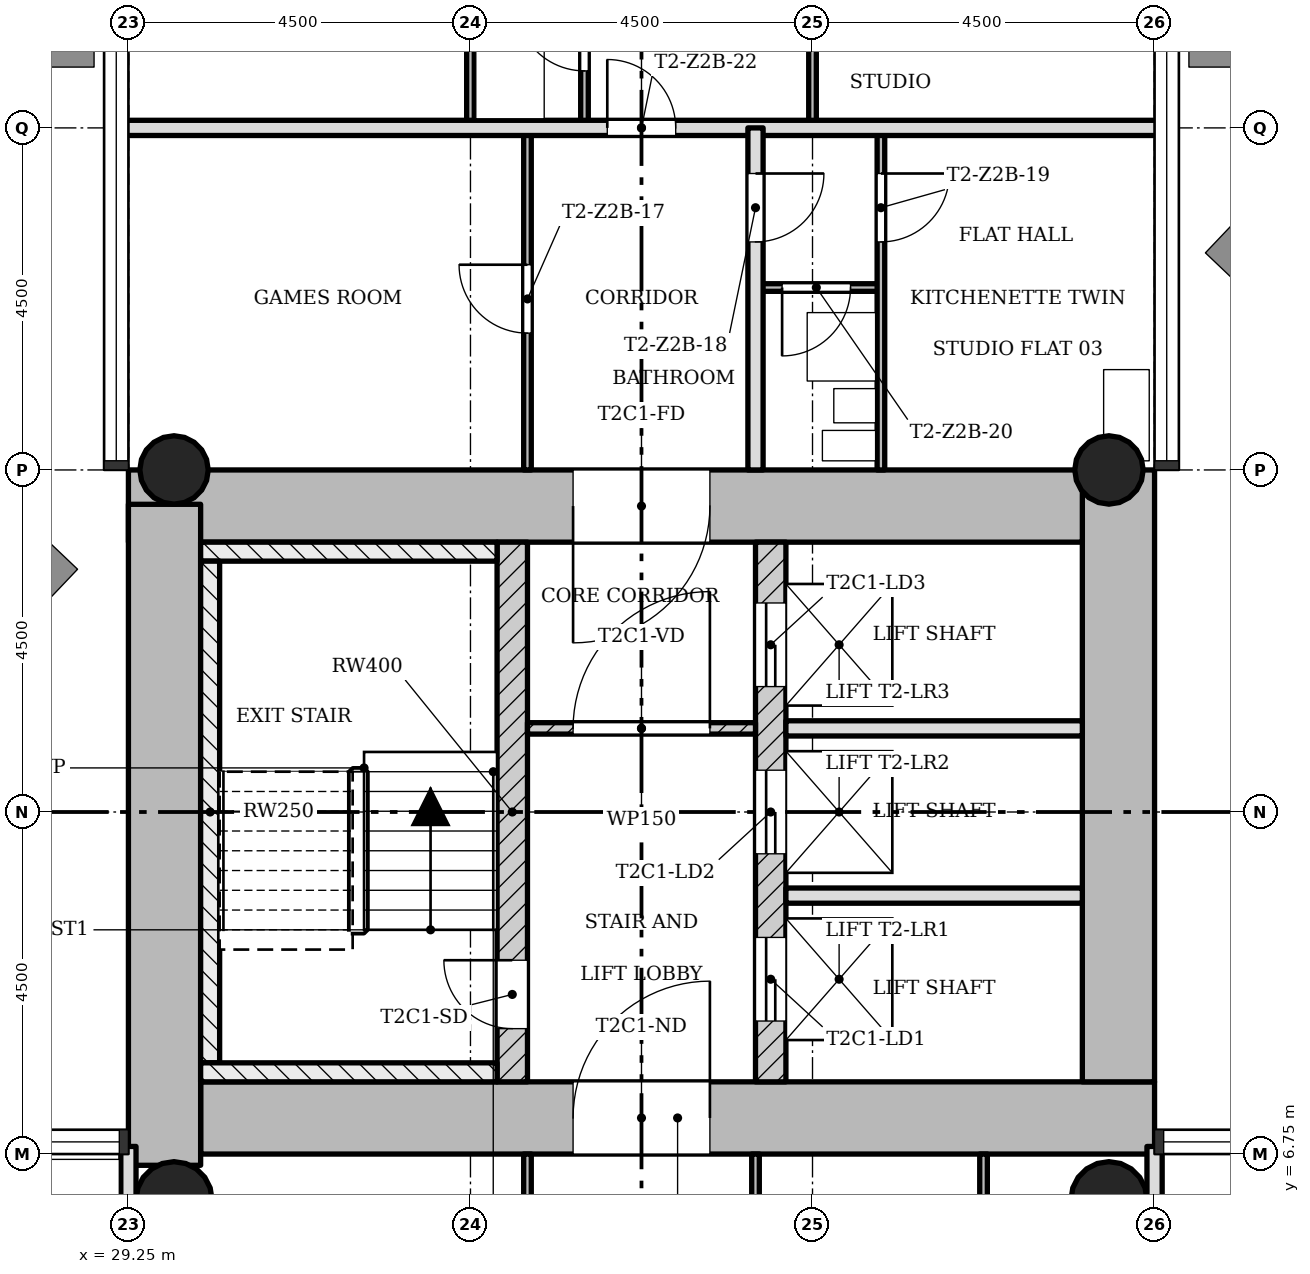
"""IFC4 building model, lengths in metres.
Left out: names, types, materials, properties, quantities, classifications, styles, units other than length and angle.
Written with IfcOpenShell. Run it as: python <this file> out.ifc"""

import sys

from ifc_helpers import new_model, si_unit, direction, frame, frame_2d, origin, origin_2d, place, context, subcontext, project, spatial, rectangle, hollow_circle, extrude, element, fill, save


model = new_model("IFC4")
c1 = context("Model", 3, precision=1e-05, world=origin(), true_north=direction((0.0, 1.0)))
c2 = subcontext(c1, "Body", "Model", "MODEL_VIEW")
j1 = project(units=[si_unit("LENGTHUNIT", "METRE"), si_unit("PLANEANGLEUNIT", "RADIAN")], contexts=[c1])
p1 = place(None, origin())
s1 = spatial("IfcSite", under=j1, at=p1, CompositionType="ELEMENT")
p2 = place(p1, origin())
s2 = spatial("IfcBuilding", under=s1, at=p2, CompositionType="ELEMENT")
p3 = place(p2, frame((0.0, 0.0, 80.0)))
s3 = spatial("IfcBuildingStorey", under=s2, at=p3, CompositionType="ELEMENT", Elevation=80.0)
p4 = place(p3, frame((30.2, 7.225, 0.0), z_axis=(0.0, 0.0, 1.0), x_axis=(1.0, 0.0, 0.0)))
e1 = element("IfcWall", 1, at=p4, inside=s3, PredefinedType="SHEAR", context=c2, shape_type="SweptSolid", body=[
    extrude(rectangle(XDim=12.55, YDim=0.95, at=frame_2d((6.275, 0.0))), origin(), (0.0, 0.0, 1.0), 3.4),
])
p5 = place(p4, frame((4.9, 0.0, 0.0)))
e2 = element("IfcOpeningElement", 2, at=p5, cuts=e1, PredefinedType="OPENING", context=c2, shape_type="SweptSolid", body=[
    extrude(rectangle(XDim=1.8, YDim=2.1, at=frame_2d((0.9, 1.05))), frame((0.0, 0.485, 0.0), z_axis=(0.0, -1.0, 0.0), x_axis=(1.0, 0.0, 0.0)), (0.0, 0.0, 1.0), 0.97),
])
p6 = place(p3, frame((42.275, 7.7, 0.0), z_axis=(0.0, 0.0, 1.0), x_axis=(0.0, 1.0, 0.0)))
e3 = element("IfcWall", 3, at=p6, inside=s3, PredefinedType="SHEAR", context=c2, shape_type="SweptSolid", body=[
    extrude(rectangle(XDim=8.05, YDim=0.95, at=frame_2d((4.025, 0.0))), origin(), (0.0, 0.0, 1.0), 3.4),
])
p7 = place(p3, frame((41.8, 15.275, 0.0), z_axis=(0.0, 0.0, 1.0), x_axis=(-1.0, 0.0, 0.0)))
e4 = element("IfcWall", 4, at=p7, inside=s3, PredefinedType="SHEAR", context=c2, shape_type="SweptSolid", body=[
    extrude(rectangle(XDim=12.55, YDim=0.95, at=frame_2d((6.275, 0.0))), origin(), (0.0, 0.0, 1.0), 3.4),
])
p8 = place(p7, frame((4.9, 0.0, 0.0)))
e5 = element("IfcOpeningElement", 5, at=p8, cuts=e4, PredefinedType="OPENING", context=c2, shape_type="SweptSolid", body=[
    extrude(rectangle(XDim=1.8, YDim=2.1, at=frame_2d((0.9, 1.05))), frame((0.0, 0.485, 0.0), z_axis=(0.0, -1.0, 0.0), x_axis=(1.0, 0.0, 0.0)), (0.0, 0.0, 1.0), 0.97),
])
p9 = place(p3, frame((29.725, 15.298, 0.0), z_axis=(0.0, 0.0, 1.0), x_axis=(0.0, -1.0, 0.0)))
e6 = element("IfcWall", 6, at=p9, inside=s3, PredefinedType="SHEAR", context=c2, shape_type="SweptSolid", body=[
    extrude(rectangle(XDim=8.696, YDim=0.95, at=frame_2d((4.348, 0.0))), origin(), (0.0, 0.0, 1.0), 3.4),
])
p10 = place(p3, frame((34.3, 7.7, 0.0), z_axis=(0.0, 0.0, 1.0), x_axis=(0.0, 1.0, 0.0)))
e7 = element("IfcWall", 7, at=p10, inside=s3, PredefinedType="SHEAR", context=c2, shape_type="SweptSolid", body=[
    extrude(rectangle(XDim=7.1, YDim=0.4, at=frame_2d((3.55, 0.0))), origin(), (0.0, 0.0, 1.0), 3.4),
])
p11 = place(p10, frame((0.7, 0.0, 0.0)))
e8 = element("IfcOpeningElement", 8, at=p11, cuts=e7, PredefinedType="OPENING", context=c2, shape_type="SweptSolid", body=[
    extrude(rectangle(XDim=0.9, YDim=2.1, at=frame_2d((0.45, 1.05))), frame((0.0, 0.21, 0.0), z_axis=(0.0, -1.0, 0.0), x_axis=(1.0, 0.0, 0.0)), (0.0, 0.0, 1.0), 0.42),
])
p12 = place(p3, frame((37.7, 7.7, 0.0), z_axis=(0.0, 0.0, 1.0), x_axis=(0.0, 1.0, 0.0)))
e9 = element("IfcWall", 9, at=p12, inside=s3, PredefinedType="SHEAR", context=c2, shape_type="SweptSolid", body=[
    extrude(rectangle(XDim=7.1, YDim=0.4, at=frame_2d((3.55, 0.0))), origin(), (0.0, 0.0, 1.0), 3.4),
])
p13 = place(p12, frame((0.8, 0.0, 0.0)))
e10 = element("IfcOpeningElement", 10, at=p13, cuts=e9, PredefinedType="OPENING", context=c2, shape_type="SweptSolid", body=[
    extrude(rectangle(XDim=1.1, YDim=2.1, at=frame_2d((0.55, 1.05))), frame((0.0, 0.21, 0.0), z_axis=(0.0, -1.0, 0.0), x_axis=(1.0, 0.0, 0.0)), (0.0, 0.0, 1.0), 0.42),
])
p14 = place(p12, frame((3.0, 0.0, 0.0)))
e11 = element("IfcOpeningElement", 11, at=p14, cuts=e9, PredefinedType="OPENING", context=c2, shape_type="SweptSolid", body=[
    extrude(rectangle(XDim=1.1, YDim=2.1, at=frame_2d((0.55, 1.05))), frame((0.0, 0.21, 0.0), z_axis=(0.0, -1.0, 0.0), x_axis=(1.0, 0.0, 0.0)), (0.0, 0.0, 1.0), 0.42),
])
p15 = place(p12, frame((5.2, 0.0, 0.0)))
e12 = element("IfcOpeningElement", 12, at=p15, cuts=e9, PredefinedType="OPENING", context=c2, shape_type="SweptSolid", body=[
    extrude(rectangle(XDim=1.1, YDim=2.1, at=frame_2d((0.55, 1.05))), frame((0.0, 0.21, 0.0), z_axis=(0.0, -1.0, 0.0), x_axis=(1.0, 0.0, 0.0)), (0.0, 0.0, 1.0), 0.42),
])
for number, where, z_axis, x_axis in (
    (13, (42.15, 15.75, 0.0), (0.0, 0.0, 1.0), (1.0, 0.0, 0.0)),
    (14, (29.85, 15.75, 0.0), (0.0, 0.0, 1.0), (1.0, 0.0, 0.0)),
):
    element("IfcColumn", number, at=place(p3, frame(where, z_axis=z_axis, x_axis=x_axis)), inside=s3, PredefinedType="COLUMN", context=c2, shape_type="SweptSolid", body=[
        extrude(hollow_circle(Radius=0.45, WallThickness=0.032, at=origin_2d()), origin(), (0.0, 0.0, 1.0), 3.4),
    ])
for number, where, z_axis, x_axis in (
    (15, (42.15, 6.15, 0.0), (0.0, 0.0, 1.0), (1.0, 0.0, 0.0)),
    (16, (29.85, 6.15, 0.0), (0.0, 0.0, 1.0), (1.0, 0.0, 0.0)),
):
    element("IfcColumn", number, at=place(p3, frame(where, z_axis=z_axis, x_axis=x_axis)), inside=s3, PredefinedType="COLUMN", context=c2, shape_type="SweptSolid", body=[
        extrude(hollow_circle(Radius=0.5, WallThickness=0.036, at=origin_2d()), origin(), (0.0, 0.0, 1.0), 3.4),
    ])
p16 = place(p3, frame((37.5, 12.35, 0.0), z_axis=(0.0, 0.0, 1.0), x_axis=(-1.0, 0.0, 0.0)))
e17 = element("IfcWall", 17, at=p16, inside=s3, PredefinedType="PARTITIONING", context=c2, shape_type="SweptSolid", body=[
    extrude(rectangle(XDim=3.0, YDim=0.15, at=frame_2d((1.5, 0.0))), origin(), (0.0, 0.0, 1.0), 3.0),
])
p17 = place(p16, frame((0.6, 0.0, 0.0)))
e18 = element("IfcOpeningElement", 18, at=p17, cuts=e17, PredefinedType="OPENING", context=c2, shape_type="SweptSolid", body=[
    extrude(rectangle(XDim=1.8, YDim=2.1, at=frame_2d((0.9, 1.05))), frame((0.0, 0.085, 0.0), z_axis=(0.0, -1.0, 0.0), x_axis=(1.0, 0.0, 0.0)), (0.0, 0.0, 1.0), 0.17),
])
for number, where, z_axis, x_axis in (
    (19, (41.8, 10.15, 0.0), (0.0, 0.0, 1.0), (-1.0, 0.0, 0.0)),
    (20, (41.8, 12.35, 0.0), (0.0, 0.0, 1.0), (-1.0, 0.0, 0.0)),
):
    element("IfcWall", number, at=place(p3, frame(where, z_axis=z_axis, x_axis=x_axis)), inside=s3, PredefinedType="SOLIDWALL", context=c2, shape_type="SweptSolid", body=[
        extrude(rectangle(XDim=3.9, YDim=0.2, at=frame_2d((1.95, 0.0))), origin(), (0.0, 0.0, 1.0), 3.0),
    ])
p18 = place(p3, frame((39.15, 18.15, 0.0), z_axis=(0.0, 0.0, 1.0), x_axis=(-1.0, 0.0, 0.0)))
e21 = element("IfcWall", 21, at=p18, inside=s3, PredefinedType="PARTITIONING", context=c2, shape_type="SweptSolid", body=[
    extrude(rectangle(XDim=1.65, YDim=0.1, at=frame_2d((0.825, 0.0))), origin(), (0.0, 0.0, 1.0), 3.0),
])
p19 = place(p18, frame((0.4, 0.0, 0.0)))
e22 = element("IfcOpeningElement", 22, at=p19, cuts=e21, PredefinedType="OPENING", context=c2, shape_type="SweptSolid", body=[
    extrude(rectangle(XDim=0.9, YDim=2.1, at=frame_2d((0.45, 1.05))), frame((0.0, 0.06, 0.0), z_axis=(0.0, -1.0, 0.0), x_axis=(1.0, 0.0, 0.0)), (0.0, 0.0, 1.0), 0.12),
])
p20 = place(p3, frame((42.85, 20.25, 0.0), z_axis=(0.0, 0.0, 1.0), x_axis=(-1.0, 0.0, 0.0)))
e23 = element("IfcWall", 23, at=p20, inside=s3, PredefinedType="SOLIDWALL", context=c2, shape_type="SweptSolid", body=[
    extrude(rectangle(XDim=13.7, YDim=0.2, at=frame_2d((6.85, 0.0))), origin(), (0.0, 0.0, 1.0), 3.0),
])
p21 = place(p20, frame((6.4, 0.0, 0.0)))
e24 = element("IfcOpeningElement", 24, at=p21, cuts=e23, PredefinedType="OPENING", context=c2, shape_type="SweptSolid", body=[
    extrude(rectangle(XDim=0.9, YDim=2.1, at=frame_2d((0.45, 1.05))), frame((0.0, 0.11, 0.0), z_axis=(0.0, -1.0, 0.0), x_axis=(1.0, 0.0, 0.0)), (0.0, 0.0, 1.0), 0.22),
])
p22 = place(p3, frame((42.75, 0.9, 0.0), z_axis=(0.0, 0.0, 1.0), x_axis=(0.0, 1.0, 0.0)))
e25 = element("IfcWall", 25, at=p22, inside=s3, PredefinedType="SOLIDWALL", context=c2, shape_type="SweptSolid", body=[
    extrude(rectangle(XDim=5.95, YDim=0.2, at=frame_2d((2.975, 0.0))), origin(), (0.0, 0.0, 1.0), 3.0),
])
p23 = place(p3, frame((40.5, 0.9, 0.0), z_axis=(0.0, 0.0, 1.0), x_axis=(0.0, 1.0, 0.0)))
e26 = element("IfcWall", 26, at=p23, inside=s3, PredefinedType="PARTITIONING", context=c2, shape_type="SweptSolid", body=[
    extrude(rectangle(XDim=5.85, YDim=0.1, at=frame_2d((2.925, 0.0))), origin(), (0.0, 0.0, 1.0), 3.0),
])
p24 = place(p3, frame((39.15, 15.75, 0.0), z_axis=(0.0, 0.0, 1.0), x_axis=(0.0, 1.0, 0.0)))
e27 = element("IfcWall", 27, at=p24, inside=s3, PredefinedType="PARTITIONING", context=c2, shape_type="SweptSolid", body=[
    extrude(rectangle(XDim=4.5, YDim=0.1, at=frame_2d((2.25, 0.0))), origin(), (0.0, 0.0, 1.0), 3.0),
])
p25 = place(p24, frame((3.0, 0.0, 0.0)))
e28 = element("IfcOpeningElement", 28, at=p25, cuts=e27, PredefinedType="OPENING", context=c2, shape_type="SweptSolid", body=[
    extrude(rectangle(XDim=0.9, YDim=2.1, at=frame_2d((0.45, 1.05))), frame((0.0, 0.06, 0.0), z_axis=(0.0, -1.0, 0.0), x_axis=(1.0, 0.0, 0.0)), (0.0, 0.0, 1.0), 0.12),
])
p26 = place(p3, frame((38.25, 20.25, 0.0), z_axis=(0.0, 0.0, 1.0), x_axis=(0.0, 1.0, 0.0)))
e29 = element("IfcWall", 29, at=p26, inside=s3, PredefinedType="PARTITIONING", context=c2, shape_type="SweptSolid", body=[
    extrude(rectangle(XDim=4.6, YDim=0.1, at=frame_2d((2.3, 0.0))), origin(), (0.0, 0.0, 1.0), 3.0),
])
p27 = place(p26, frame((1.8, 0.0, 0.0)))
e30 = element("IfcOpeningElement", 30, at=p27, cuts=e29, PredefinedType="OPENING", context=c2, shape_type="SweptSolid", body=[
    extrude(rectangle(XDim=0.9, YDim=2.1, at=frame_2d((0.45, 1.05))), frame((0.0, 0.06, 0.0), z_axis=(0.0, -1.0, 0.0), x_axis=(1.0, 0.0, 0.0)), (0.0, 0.0, 1.0), 0.12),
])
p28 = place(p3, frame((37.5, 0.9, 0.0), z_axis=(0.0, 0.0, 1.0), x_axis=(0.0, 1.0, 0.0)))
e31 = element("IfcWall", 31, at=p28, inside=s3, PredefinedType="PARTITIONING", context=c2, shape_type="SweptSolid", body=[
    extrude(rectangle(XDim=5.85, YDim=0.1, at=frame_2d((2.925, 0.0))), origin(), (0.0, 0.0, 1.0), 3.0),
])
p29 = place(p28, frame((2.475, 0.0, 0.0)))
e32 = element("IfcOpeningElement", 32, at=p29, cuts=e31, PredefinedType="OPENING", context=c2, shape_type="SweptSolid", body=[
    extrude(rectangle(XDim=0.9, YDim=2.1, at=frame_2d((0.45, 1.05))), frame((0.0, 0.06, 0.0), z_axis=(0.0, -1.0, 0.0), x_axis=(1.0, 0.0, 0.0)), (0.0, 0.0, 1.0), 0.12),
])
p30 = place(p3, frame((37.5, 15.75, 0.0), z_axis=(0.0, 0.0, 1.0), x_axis=(0.0, 1.0, 0.0)))
e33 = element("IfcWall", 33, at=p30, inside=s3, PredefinedType="SOLIDWALL", context=c2, shape_type="SweptSolid", body=[
    extrude(rectangle(XDim=4.5, YDim=0.2, at=frame_2d((2.25, 0.0))), origin(), (0.0, 0.0, 1.0), 3.0),
])
p31 = place(p30, frame((3.0, 0.0, 0.0)))
e34 = element("IfcOpeningElement", 34, at=p31, cuts=e33, PredefinedType="OPENING", context=c2, shape_type="SweptSolid", body=[
    extrude(rectangle(XDim=0.9, YDim=2.1, at=frame_2d((0.45, 1.05))), frame((0.0, 0.11, 0.0), z_axis=(0.0, -1.0, 0.0), x_axis=(1.0, 0.0, 0.0)), (0.0, 0.0, 1.0), 0.22),
])
p32 = place(p3, frame((35.25, 20.25, 0.0), z_axis=(0.0, 0.0, 1.0), x_axis=(0.0, 1.0, 0.0)))
e35 = element("IfcWall", 35, at=p32, inside=s3, PredefinedType="PARTITIONING", context=c2, shape_type="SweptSolid", body=[
    extrude(rectangle(XDim=2.4, YDim=0.1, at=frame_2d((1.2, 0.0))), origin(), (0.0, 0.0, 1.0), 3.0),
])
p33 = place(p32, frame((0.75, 0.0, 0.0)))
e36 = element("IfcOpeningElement", 36, at=p33, cuts=e35, PredefinedType="OPENING", context=c2, shape_type="SweptSolid", body=[
    extrude(rectangle(XDim=0.9, YDim=2.1, at=frame_2d((0.45, 1.05))), frame((0.0, 0.06, 0.0), z_axis=(0.0, -1.0, 0.0), x_axis=(1.0, 0.0, 0.0)), (0.0, 0.0, 1.0), 0.12),
])
p34 = place(p3, frame((34.5, 0.9, 0.0), z_axis=(0.0, 0.0, 1.0), x_axis=(0.0, 1.0, 0.0)))
e37 = element("IfcWall", 37, at=p34, inside=s3, PredefinedType="PARTITIONING", context=c2, shape_type="SweptSolid", body=[
    extrude(rectangle(XDim=5.85, YDim=0.1, at=frame_2d((2.925, 0.0))), origin(), (0.0, 0.0, 1.0), 3.0),
])
p35 = place(p34, frame((2.475, 0.0, 0.0)))
e38 = element("IfcOpeningElement", 38, at=p35, cuts=e37, PredefinedType="OPENING", context=c2, shape_type="SweptSolid", body=[
    extrude(rectangle(XDim=0.9, YDim=2.1, at=frame_2d((0.45, 1.05))), frame((0.0, 0.06, 0.0), z_axis=(0.0, -1.0, 0.0), x_axis=(1.0, 0.0, 0.0)), (0.0, 0.0, 1.0), 0.12),
])
p36 = place(p3, frame((34.5, 15.75, 0.0), z_axis=(0.0, 0.0, 1.0), x_axis=(0.0, 1.0, 0.0)))
e39 = element("IfcWall", 39, at=p36, inside=s3, PredefinedType="PARTITIONING", context=c2, shape_type="SweptSolid", body=[
    extrude(rectangle(XDim=4.5, YDim=0.1, at=frame_2d((2.25, 0.0))), origin(), (0.0, 0.0, 1.0), 3.0),
])
p37 = place(p36, frame((1.8, 0.0, 0.0)))
e40 = element("IfcOpeningElement", 40, at=p37, cuts=e39, PredefinedType="OPENING", context=c2, shape_type="SweptSolid", body=[
    extrude(rectangle(XDim=0.9, YDim=2.1, at=frame_2d((0.45, 1.05))), frame((0.0, 0.06, 0.0), z_axis=(0.0, -1.0, 0.0), x_axis=(1.0, 0.0, 0.0)), (0.0, 0.0, 1.0), 0.12),
])
p38 = place(p3, frame((33.75, 20.25, 0.0), z_axis=(0.0, 0.0, 1.0), x_axis=(0.0, 1.0, 0.0)))
e41 = element("IfcWall", 41, at=p38, inside=s3, PredefinedType="PARTITIONING", context=c2, shape_type="SweptSolid", body=[
    extrude(rectangle(XDim=4.6, YDim=0.1, at=frame_2d((2.3, 0.0))), origin(), (0.0, 0.0, 1.0), 3.0),
])
p39 = place(p38, frame((2.45, 0.0, 0.0)))
e42 = element("IfcOpeningElement", 42, at=p39, cuts=e41, PredefinedType="OPENING", context=c2, shape_type="SweptSolid", body=[
    extrude(rectangle(XDim=0.9, YDim=2.1, at=frame_2d((0.45, 1.05))), frame((0.0, 0.06, 0.0), z_axis=(0.0, -1.0, 0.0), x_axis=(1.0, 0.0, 0.0)), (0.0, 0.0, 1.0), 0.12),
])
p40 = place(p3, frame((29.25, 0.9, 0.0), z_axis=(0.0, 0.0, 1.0), x_axis=(0.0, 1.0, 0.0)))
e43 = element("IfcWall", 43, at=p40, inside=s3, PredefinedType="SOLIDWALL", context=c2, shape_type="SweptSolid", body=[
    extrude(rectangle(XDim=5.95, YDim=0.2, at=frame_2d((2.975, 0.0))), origin(), (0.0, 0.0, 1.0), 3.0),
])
p41 = place(p3, frame((34.1, 14.675, 0.0), z_axis=(0.0, 0.0, 1.0), x_axis=(-1.0, 0.0, 0.0)))
e44 = element("IfcWall", 44, at=p41, inside=s3, PredefinedType="SHEAR", context=c2, shape_type="SweptSolid", body=[
    extrude(rectangle(XDim=3.9, YDim=0.25, at=frame_2d((1.95, 0.0))), origin(), (0.0, 0.0, 1.0), 3.4),
])
p42 = place(p3, frame((30.325, 7.95, 0.0), z_axis=(0.0, 0.0, 1.0), x_axis=(0.0, 1.0, 0.0)))
e45 = element("IfcWall", 45, at=p42, inside=s3, PredefinedType="SHEAR", context=c2, shape_type="SweptSolid", body=[
    extrude(rectangle(XDim=6.6, YDim=0.25, at=frame_2d((3.3, 0.0))), origin(), (0.0, 0.0, 1.0), 3.4),
])
p43 = place(p3, frame((34.1, 7.825, 0.0), z_axis=(0.0, 0.0, 1.0), x_axis=(-1.0, 0.0, 0.0)))
e46 = element("IfcWall", 46, at=p43, inside=s3, PredefinedType="SHEAR", context=c2, shape_type="SweptSolid", body=[
    extrude(rectangle(XDim=3.9, YDim=0.25, at=frame_2d((1.95, 0.0))), origin(), (0.0, 0.0, 1.0), 3.4),
])
p44 = place(p17, origin())
e47 = element("IfcDoor", 47, at=p44, inside=s3, OperationType="SINGLE_SWING_LEFT", PredefinedType="DOOR", context=c2, shape_type="SweptSolid", body=[
    extrude(rectangle(XDim=1.8, YDim=2.1, at=frame_2d((0.9, 1.05))), frame((0.0, 0.025, 0.0), z_axis=(0.0, -1.0, 0.0), x_axis=(1.0, 0.0, 0.0)), (0.0, 0.0, 1.0), 0.05),
])
fill(e18, e47)
p45 = place(p37, origin())
e48 = element("IfcDoor", 48, at=p45, inside=s3, OperationType="SINGLE_SWING_LEFT", PredefinedType="DOOR", context=c2, shape_type="SweptSolid", body=[
    extrude(rectangle(XDim=0.9, YDim=2.1, at=frame_2d((0.45, 1.05))), frame((0.0, 0.025, 0.0), z_axis=(0.0, -1.0, 0.0), x_axis=(1.0, 0.0, 0.0)), (0.0, 0.0, 1.0), 0.05),
])
fill(e40, e48)
p46 = place(p31, origin())
e49 = element("IfcDoor", 49, at=p46, inside=s3, OperationType="SINGLE_SWING_RIGHT", PredefinedType="DOOR", context=c2, shape_type="SweptSolid", body=[
    extrude(rectangle(XDim=0.9, YDim=2.1, at=frame_2d((0.45, 1.05))), frame((0.0, 0.025, 0.0), z_axis=(0.0, -1.0, 0.0), x_axis=(1.0, 0.0, 0.0)), (0.0, 0.0, 1.0), 0.05),
])
fill(e34, e49)
p47 = place(p25, origin())
e50 = element("IfcDoor", 50, at=p47, inside=s3, OperationType="SINGLE_SWING_RIGHT", PredefinedType="DOOR", context=c2, shape_type="SweptSolid", body=[
    extrude(rectangle(XDim=0.9, YDim=2.1, at=frame_2d((0.45, 1.05))), frame((0.0, 0.025, 0.0), z_axis=(0.0, -1.0, 0.0), x_axis=(1.0, 0.0, 0.0)), (0.0, 0.0, 1.0), 0.05),
])
fill(e28, e50)
p48 = place(p19, origin())
e51 = element("IfcDoor", 51, at=p48, inside=s3, OperationType="SINGLE_SWING_LEFT", PredefinedType="DOOR", context=c2, shape_type="SweptSolid", body=[
    extrude(rectangle(XDim=0.9, YDim=2.1, at=frame_2d((0.45, 1.05))), frame((0.0, 0.025, 0.0), z_axis=(0.0, -1.0, 0.0), x_axis=(1.0, 0.0, 0.0)), (0.0, 0.0, 1.0), 0.05),
])
fill(e22, e51)
p49 = place(p33, origin())
e52 = element("IfcDoor", 52, at=p49, inside=s3, OperationType="SINGLE_SWING_LEFT", PredefinedType="DOOR", context=c2, shape_type="SweptSolid", body=[
    extrude(rectangle(XDim=0.9, YDim=2.1, at=frame_2d((0.45, 1.05))), frame((0.0, 0.025, 0.0), z_axis=(0.0, -1.0, 0.0), x_axis=(1.0, 0.0, 0.0)), (0.0, 0.0, 1.0), 0.05),
])
fill(e36, e52)
p50 = place(p21, origin())
e53 = element("IfcDoor", 53, at=p50, inside=s3, OperationType="SINGLE_SWING_RIGHT", PredefinedType="DOOR", context=c2, shape_type="SweptSolid", body=[
    extrude(rectangle(XDim=0.9, YDim=2.1, at=frame_2d((0.45, 1.05))), frame((0.0, 0.025, 0.0), z_axis=(0.0, -1.0, 0.0), x_axis=(1.0, 0.0, 0.0)), (0.0, 0.0, 1.0), 0.05),
])
fill(e24, e53)
p51 = place(p11, origin())
e54 = element("IfcDoor", 54, at=p51, inside=s3, OperationType="SINGLE_SWING_LEFT", PredefinedType="DOOR", context=c2, shape_type="SweptSolid", body=[
    extrude(rectangle(XDim=0.9, YDim=2.1, at=frame_2d((0.45, 1.05))), frame((0.0, 0.025, 0.0), z_axis=(0.0, -1.0, 0.0), x_axis=(1.0, 0.0, 0.0)), (0.0, 0.0, 1.0), 0.05),
])
fill(e8, e54)
p52 = place(p13, origin())
e55 = element("IfcDoor", 55, at=p52, inside=s3, OperationType="SLIDING_TO_LEFT", PredefinedType="DOOR", context=c2, shape_type="SweptSolid", body=[
    extrude(rectangle(XDim=1.1, YDim=2.1, at=frame_2d((0.55, 1.05))), frame((0.0, 0.025, 0.0), z_axis=(0.0, -1.0, 0.0), x_axis=(1.0, 0.0, 0.0)), (0.0, 0.0, 1.0), 0.05),
])
fill(e10, e55)
p53 = place(p14, origin())
e56 = element("IfcDoor", 56, at=p53, inside=s3, OperationType="SLIDING_TO_LEFT", PredefinedType="DOOR", context=c2, shape_type="SweptSolid", body=[
    extrude(rectangle(XDim=1.1, YDim=2.1, at=frame_2d((0.55, 1.05))), frame((0.0, 0.025, 0.0), z_axis=(0.0, -1.0, 0.0), x_axis=(1.0, 0.0, 0.0)), (0.0, 0.0, 1.0), 0.05),
])
fill(e11, e56)
p54 = place(p15, origin())
e57 = element("IfcDoor", 57, at=p54, inside=s3, OperationType="SLIDING_TO_LEFT", PredefinedType="DOOR", context=c2, shape_type="SweptSolid", body=[
    extrude(rectangle(XDim=1.1, YDim=2.1, at=frame_2d((0.55, 1.05))), frame((0.0, 0.025, 0.0), z_axis=(0.0, -1.0, 0.0), x_axis=(1.0, 0.0, 0.0)), (0.0, 0.0, 1.0), 0.05),
])
fill(e12, e57)
p55 = place(p5, origin())
e58 = element("IfcDoor", 58, at=p55, inside=s3, OperationType="SINGLE_SWING_LEFT", PredefinedType="DOOR", context=c2, shape_type="SweptSolid", body=[
    extrude(rectangle(XDim=1.8, YDim=2.1, at=frame_2d((0.9, 1.05))), frame((0.0, 0.025, 0.0), z_axis=(0.0, -1.0, 0.0), x_axis=(1.0, 0.0, 0.0)), (0.0, 0.0, 1.0), 0.05),
])
fill(e2, e58)
p56 = place(p8, origin())
e59 = element("IfcDoor", 59, at=p56, inside=s3, OperationType="SINGLE_SWING_LEFT", PredefinedType="DOOR", context=c2, shape_type="SweptSolid", body=[
    extrude(rectangle(XDim=1.8, YDim=2.1, at=frame_2d((0.9, 1.05))), frame((0.0, 0.025, 0.0), z_axis=(0.0, -1.0, 0.0), x_axis=(1.0, 0.0, 0.0)), (0.0, 0.0, 1.0), 0.05),
])
fill(e5, e59)
save(model, sys.argv[1])
